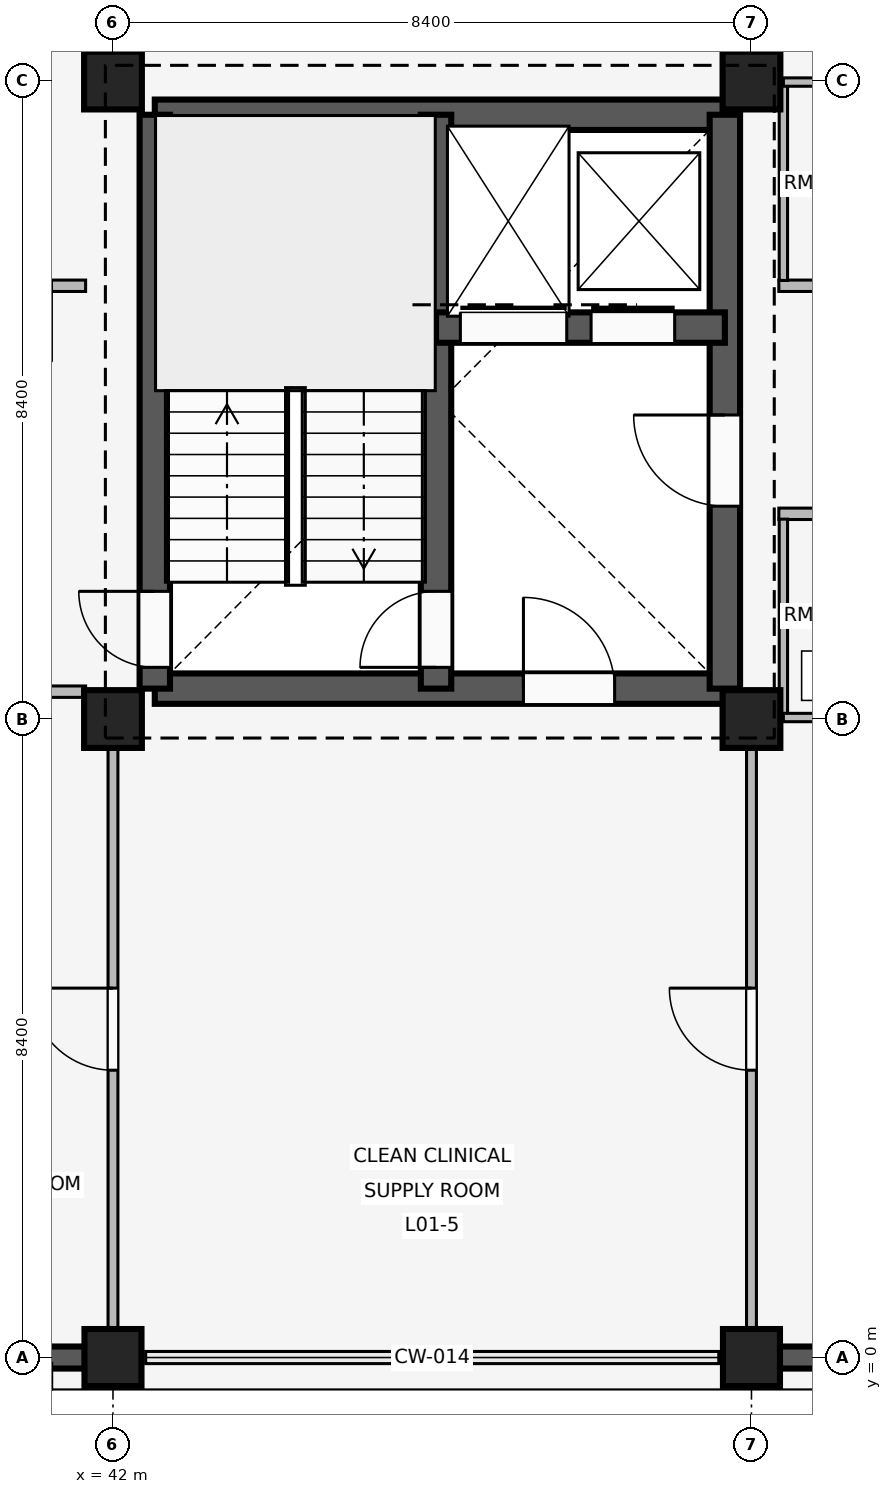
"""IFC4 building model, lengths in metres.
Left out: names, types, materials, properties, quantities, classifications, styles, units other than length and angle.
Written with IfcOpenShell. Run it as: python <this file> out.ifc"""

import sys

from ifc_helpers import new_model, si_unit, direction, frame, frame_2d, origin, origin_2d, place, context, subcontext, project, spatial, rectangle, extrude, element, fill, save


model = new_model("IFC4")
c1 = context("Model", 3, precision=1e-05, world=origin(), true_north=direction((0.0, 1.0)))
c2 = subcontext(c1, "Body", "Model", "MODEL_VIEW")
j1 = project(units=[si_unit("LENGTHUNIT", "METRE"), si_unit("PLANEANGLEUNIT", "RADIAN")], contexts=[c1])
p1 = place(None, origin())
s1 = spatial("IfcSite", under=j1, at=p1, CompositionType="ELEMENT")
p2 = place(p1, origin())
s2 = spatial("IfcBuilding", under=s1, at=p2, CompositionType="ELEMENT")
p3 = place(p2, frame((0.0, 0.0, 4.8)))
s3 = spatial("IfcBuildingStorey", under=s2, at=p3, CompositionType="ELEMENT", Elevation=4.8)
p4 = place(p3, frame((42.0, 0.0, 0.0), z_axis=(0.0, 0.0, 1.0), x_axis=(1.0, 0.0, 0.0)))
e1 = element("IfcColumn", 1, at=p4, inside=s3, PredefinedType="COLUMN", context=c2, shape_type="SweptSolid", body=[
    extrude(rectangle(XDim=0.75, YDim=0.75, at=origin_2d()), origin(), (0.0, 0.0, 1.0), 3.3),
])
for number, where, z_axis, x_axis in (
    (2, (42.0, 8.4, 0.0), (0.0, 0.0, 1.0), (1.0, 0.0, 0.0)),
    (3, (42.0, 16.8, 0.0), (0.0, 0.0, 1.0), (1.0, 0.0, 0.0)),
):
    element("IfcColumn", number, at=place(p3, frame(where, z_axis=z_axis, x_axis=x_axis)), inside=s3, PredefinedType="COLUMN", context=c2, shape_type="SweptSolid", body=[
        extrude(rectangle(XDim=0.76, YDim=0.76, at=origin_2d()), origin(), (0.0, 0.0, 1.0), 3.3),
    ])
p5 = place(p3, frame((50.4, 0.0, 0.0), z_axis=(0.0, 0.0, 1.0), x_axis=(1.0, 0.0, 0.0)))
e4 = element("IfcColumn", 4, at=p5, inside=s3, PredefinedType="COLUMN", context=c2, shape_type="SweptSolid", body=[
    extrude(rectangle(XDim=0.75, YDim=0.75, at=origin_2d()), origin(), (0.0, 0.0, 1.0), 3.3),
])
for number, where, z_axis, x_axis in (
    (5, (50.4, 8.4, 0.0), (0.0, 0.0, 1.0), (1.0, 0.0, 0.0)),
    (6, (50.4, 16.8, 0.0), (0.0, 0.0, 1.0), (1.0, 0.0, 0.0)),
):
    element("IfcColumn", number, at=place(p3, frame(where, z_axis=z_axis, x_axis=x_axis)), inside=s3, PredefinedType="COLUMN", context=c2, shape_type="SweptSolid", body=[
        extrude(rectangle(XDim=0.76, YDim=0.76, at=origin_2d()), origin(), (0.0, 0.0, 1.0), 3.3),
    ])
p6 = place(p3, frame((41.63, 0.0, 0.0), z_axis=(0.0, 0.0, 1.0), x_axis=(-1.0, 0.0, 0.0)))
e7 = element("IfcWall", 7, at=p6, inside=s3, PredefinedType="SOLIDWALL", context=c2, shape_type="SweptSolid", body=[
    extrude(rectangle(XDim=7.66, YDim=0.29, at=frame_2d((3.83, 0.0))), origin(), (0.0, 0.0, 1.0), 2.42),
])
p7 = place(p6, frame((5.088, 0.0, 0.85)))
e8 = element("IfcOpeningElement", 8, at=p7, cuts=e7, PredefinedType="OPENING", context=c2, shape_type="SweptSolid", body=[
    extrude(rectangle(XDim=1.62, YDim=0.95, at=frame_2d((0.81, 0.475))), frame((0.0, 0.155, 0.0), z_axis=(0.0, -1.0, 0.0), x_axis=(1.0, 0.0, 0.0)), (0.0, 0.0, 1.0), 0.31),
])
p8 = place(p3, frame((58.43, 0.0, 0.0), z_axis=(0.0, 0.0, 1.0), x_axis=(-1.0, 0.0, 0.0)))
e9 = element("IfcWall", 9, at=p8, inside=s3, PredefinedType="SOLIDWALL", context=c2, shape_type="SweptSolid", body=[
    extrude(rectangle(XDim=7.66, YDim=0.29, at=frame_2d((3.83, 0.0))), origin(), (0.0, 0.0, 1.0), 2.42),
])
p9 = place(p8, frame((0.952, 0.0, 0.85)))
e10 = element("IfcOpeningElement", 10, at=p9, cuts=e9, PredefinedType="OPENING", context=c2, shape_type="SweptSolid", body=[
    extrude(rectangle(XDim=1.62, YDim=0.95, at=frame_2d((0.81, 0.475))), frame((0.0, 0.155, 0.0), z_axis=(0.0, -1.0, 0.0), x_axis=(1.0, 0.0, 0.0)), (0.0, 0.0, 1.0), 0.31),
])
p10 = place(p8, frame((5.088, 0.0, 0.85)))
e11 = element("IfcOpeningElement", 11, at=p10, cuts=e9, PredefinedType="OPENING", context=c2, shape_type="SweptSolid", body=[
    extrude(rectangle(XDim=1.62, YDim=0.95, at=frame_2d((0.81, 0.475))), frame((0.0, 0.155, 0.0), z_axis=(0.0, -1.0, 0.0), x_axis=(1.0, 0.0, 0.0)), (0.0, 0.0, 1.0), 0.31),
])
p11 = place(p3, frame((42.55, 8.8, 0.0), z_axis=(0.0, 0.0, 1.0), x_axis=(1.0, 0.0, 0.0)))
e12 = element("IfcWall", 12, at=p11, inside=s3, PredefinedType="SHEAR", context=c2, shape_type="SweptSolid", body=[
    extrude(rectangle(XDim=7.5, YDim=0.4, at=frame_2d((3.75, 0.0))), origin(), (0.0, 0.0, 1.0), 3.02),
])
p12 = place(p11, frame((4.85, 0.0, 0.0)))
e13 = element("IfcOpeningElement", 13, at=p12, cuts=e12, PredefinedType="OPENING", context=c2, shape_type="SweptSolid", body=[
    extrude(rectangle(XDim=1.2, YDim=2.1, at=frame_2d((0.6, 1.05))), frame((0.0, 0.21, 0.0), z_axis=(0.0, -1.0, 0.0), x_axis=(1.0, 0.0, 0.0)), (0.0, 0.0, 1.0), 0.42),
])
p13 = place(p3, frame((42.55, 16.35, 0.0), z_axis=(0.0, 0.0, 1.0), x_axis=(1.0, 0.0, 0.0)))
e14 = element("IfcWall", 14, at=p13, inside=s3, PredefinedType="SHEAR", context=c2, shape_type="SweptSolid", body=[
    extrude(rectangle(XDim=7.5, YDim=0.4, at=frame_2d((3.75, 0.0))), origin(), (0.0, 0.0, 1.0), 3.02),
])
p14 = place(p3, frame((42.55, 8.8, 0.0), z_axis=(0.0, 0.0, 1.0), x_axis=(0.0, 1.0, 0.0)))
e15 = element("IfcWall", 15, at=p14, inside=s3, PredefinedType="SHEAR", context=c2, shape_type="SweptSolid", body=[
    extrude(rectangle(XDim=7.55, YDim=0.4, at=frame_2d((3.775, 0.0))), origin(), (0.0, 0.0, 1.0), 3.02),
])
p15 = place(p14, frame((0.28, 0.0, 0.0)))
e16 = element("IfcOpeningElement", 16, at=p15, cuts=e15, PredefinedType="OPENING", context=c2, shape_type="SweptSolid", body=[
    extrude(rectangle(XDim=1.0, YDim=2.15, at=frame_2d((0.5, 1.075))), frame((0.0, 0.21, 0.0), z_axis=(0.0, -1.0, 0.0), x_axis=(1.0, 0.0, 0.0)), (0.0, 0.0, 1.0), 0.42),
])
p16 = place(p3, frame((50.05, 8.8, 0.0), z_axis=(0.0, 0.0, 1.0), x_axis=(0.0, 1.0, 0.0)))
e17 = element("IfcWall", 17, at=p16, inside=s3, PredefinedType="SHEAR", context=c2, shape_type="SweptSolid", body=[
    extrude(rectangle(XDim=7.55, YDim=0.4, at=frame_2d((3.775, 0.0))), origin(), (0.0, 0.0, 1.0), 3.02),
])
p17 = place(p16, frame((2.4, 0.0, 0.0)))
e18 = element("IfcOpeningElement", 18, at=p17, cuts=e17, PredefinedType="OPENING", context=c2, shape_type="SweptSolid", body=[
    extrude(rectangle(XDim=1.2, YDim=2.2, at=frame_2d((0.6, 1.1))), frame((0.0, 0.21, 0.0), z_axis=(0.0, -1.0, 0.0), x_axis=(1.0, 0.0, 0.0)), (0.0, 0.0, 1.0), 0.42),
])
p18 = place(p3, frame((46.25, 8.8, 0.0), z_axis=(0.0, 0.0, 1.0), x_axis=(0.0, 1.0, 0.0)))
e19 = element("IfcWall", 19, at=p18, inside=s3, PredefinedType="SHEAR", context=c2, shape_type="SweptSolid", body=[
    extrude(rectangle(XDim=7.55, YDim=0.4, at=frame_2d((3.775, 0.0))), origin(), (0.0, 0.0, 1.0), 3.02),
])
p19 = place(p18, frame((0.28, 0.0, 0.0)))
e20 = element("IfcOpeningElement", 20, at=p19, cuts=e19, PredefinedType="OPENING", context=c2, shape_type="SweptSolid", body=[
    extrude(rectangle(XDim=1.0, YDim=2.15, at=frame_2d((0.5, 1.075))), frame((0.0, 0.21, 0.0), z_axis=(0.0, -1.0, 0.0), x_axis=(1.0, 0.0, 0.0)), (0.0, 0.0, 1.0), 0.42),
])
p20 = place(p3, frame((46.25, 13.55, 0.0), z_axis=(0.0, 0.0, 1.0), x_axis=(1.0, 0.0, 0.0)))
e21 = element("IfcWall", 21, at=p20, inside=s3, PredefinedType="SHEAR", context=c2, shape_type="SweptSolid", body=[
    extrude(rectangle(XDim=3.8, YDim=0.4, at=frame_2d((1.9, 0.0))), origin(), (0.0, 0.0, 1.0), 3.02),
])
p21 = place(p20, frame((0.32, 0.0, 0.0)))
e22 = element("IfcOpeningElement", 22, at=p21, cuts=e21, PredefinedType="OPENING", context=c2, shape_type="SweptSolid", body=[
    extrude(rectangle(XDim=1.4, YDim=2.25, at=frame_2d((0.7, 1.125))), frame((0.0, 0.21, 0.0), z_axis=(0.0, -1.0, 0.0), x_axis=(1.0, 0.0, 0.0)), (0.0, 0.0, 1.0), 0.42),
])
p22 = place(p20, frame((2.04, 0.0, 0.0)))
e23 = element("IfcOpeningElement", 23, at=p22, cuts=e21, PredefinedType="OPENING", context=c2, shape_type="SweptSolid", body=[
    extrude(rectangle(XDim=1.1, YDim=2.15, at=frame_2d((0.55, 1.075))), frame((0.0, 0.21, 0.0), z_axis=(0.0, -1.0, 0.0), x_axis=(1.0, 0.0, 0.0)), (0.0, 0.0, 1.0), 0.42),
])
p23 = place(p3, frame((39.46, 8.76, 0.0), z_axis=(0.0, 0.0, 1.0), x_axis=(1.0, 0.0, 0.0)))
e24 = element("IfcWall", 24, at=p23, inside=s3, PredefinedType="PARTITIONING", context=c2, shape_type="SweptSolid", body=[
    extrude(rectangle(XDim=2.18, YDim=0.15, at=frame_2d((1.09, 0.0))), origin(), (0.0, 0.0, 1.0), 2.4),
])
p24 = place(p23, frame((0.5, 0.0, 0.0)))
e25 = element("IfcOpeningElement", 25, at=p24, cuts=e24, PredefinedType="OPENING", context=c2, shape_type="SweptSolid", body=[
    extrude(rectangle(XDim=1.08, YDim=2.15, at=frame_2d((0.54, 1.075))), frame((0.0, 0.085, 0.0), z_axis=(0.0, -1.0, 0.0), x_axis=(1.0, 0.0, 0.0)), (0.0, 0.0, 1.0), 0.17),
])
p25 = place(p3, frame((41.64, 14.1, 0.0), z_axis=(0.0, 0.0, 1.0), x_axis=(-1.0, 0.0, 0.0)))
e26 = element("IfcWall", 26, at=p25, inside=s3, PredefinedType="PARTITIONING", context=c2, shape_type="SweptSolid", body=[
    extrude(rectangle(XDim=7.96, YDim=0.15, at=frame_2d((3.98, 0.0))), origin(), (0.0, 0.0, 1.0), 2.4),
])
p26 = place(p25, frame((0.45, 0.0, 0.0)))
e27 = element("IfcOpeningElement", 27, at=p26, cuts=e26, PredefinedType="OPENING", context=c2, shape_type="SweptSolid", body=[
    extrude(rectangle(XDim=1.0, YDim=2.15, at=frame_2d((0.5, 1.075))), frame((0.0, 0.085, 0.0), z_axis=(0.0, -1.0, 0.0), x_axis=(1.0, 0.0, 0.0)), (0.0, 0.0, 1.0), 0.17),
])
p27 = place(p25, frame((4.15, 0.0, 0.0)))
e28 = element("IfcOpeningElement", 28, at=p27, cuts=e26, PredefinedType="OPENING", context=c2, shape_type="SweptSolid", body=[
    extrude(rectangle(XDim=1.0, YDim=2.15, at=frame_2d((0.5, 1.075))), frame((0.0, 0.085, 0.0), z_axis=(0.0, -1.0, 0.0), x_axis=(1.0, 0.0, 0.0)), (0.0, 0.0, 1.0), 0.17),
])
p28 = place(p3, frame((42.0, 0.14, 0.0), z_axis=(0.0, 0.0, 1.0), x_axis=(0.0, 1.0, 0.0)))
e29 = element("IfcWall", 29, at=p28, inside=s3, PredefinedType="PARTITIONING", context=c2, shape_type="SweptSolid", body=[
    extrude(rectangle(XDim=8.21, YDim=0.13, at=frame_2d((4.105, 0.0))), origin(), (0.0, 0.0, 1.0), 2.4),
])
p29 = place(p28, frame((3.64, 0.0, 0.0)))
e30 = element("IfcOpeningElement", 30, at=p29, cuts=e29, PredefinedType="OPENING", context=c2, shape_type="SweptSolid", body=[
    extrude(rectangle(XDim=1.08, YDim=2.15, at=frame_2d((0.54, 1.075))), frame((0.0, 0.075, 0.0), z_axis=(0.0, -1.0, 0.0), x_axis=(1.0, 0.0, 0.0)), (0.0, 0.0, 1.0), 0.15),
])
p30 = place(p3, frame((42.0, 17.15, 0.0), z_axis=(0.0, 0.0, 1.0), x_axis=(0.0, 1.0, 0.0)))
e31 = element("IfcWall", 31, at=p30, inside=s3, PredefinedType="PARTITIONING", context=c2, shape_type="SweptSolid", body=[
    extrude(rectangle(XDim=7.91, YDim=0.13, at=frame_2d((3.955, 0.0))), origin(), (0.0, 0.0, 1.0), 2.4),
])
p31 = place(p30, frame((3.4, 0.0, 0.0)))
e32 = element("IfcOpeningElement", 32, at=p31, cuts=e31, PredefinedType="OPENING", context=c2, shape_type="SweptSolid", body=[
    extrude(rectangle(XDim=1.05, YDim=2.2, at=frame_2d((0.525, 1.1))), frame((0.0, 0.075, 0.0), z_axis=(0.0, -1.0, 0.0), x_axis=(1.0, 0.0, 0.0)), (0.0, 0.0, 1.0), 0.15),
])
p32 = place(p3, frame((50.4, 0.14, 0.0), z_axis=(0.0, 0.0, 1.0), x_axis=(0.0, 1.0, 0.0)))
e33 = element("IfcWall", 33, at=p32, inside=s3, PredefinedType="PARTITIONING", context=c2, shape_type="SweptSolid", body=[
    extrude(rectangle(XDim=8.21, YDim=0.13, at=frame_2d((4.105, 0.0))), origin(), (0.0, 0.0, 1.0), 2.4),
])
p33 = place(p32, frame((3.64, 0.0, 0.0)))
e34 = element("IfcOpeningElement", 34, at=p33, cuts=e33, PredefinedType="OPENING", context=c2, shape_type="SweptSolid", body=[
    extrude(rectangle(XDim=1.08, YDim=2.15, at=frame_2d((0.54, 1.075))), frame((0.0, 0.075, 0.0), z_axis=(0.0, -1.0, 0.0), x_axis=(1.0, 0.0, 0.0)), (0.0, 0.0, 1.0), 0.15),
])
p34 = place(p3, frame((50.4, 17.15, 0.0), z_axis=(0.0, 0.0, 1.0), x_axis=(0.0, 1.0, 0.0)))
e35 = element("IfcWall", 35, at=p34, inside=s3, PredefinedType="PARTITIONING", context=c2, shape_type="SweptSolid", body=[
    extrude(rectangle(XDim=7.91, YDim=0.13, at=frame_2d((3.955, 0.0))), origin(), (0.0, 0.0, 1.0), 2.4),
])
p35 = place(p34, frame((3.4, 0.0, 0.0)))
e36 = element("IfcOpeningElement", 36, at=p35, cuts=e35, PredefinedType="OPENING", context=c2, shape_type="SweptSolid", body=[
    extrude(rectangle(XDim=1.05, YDim=2.2, at=frame_2d((0.525, 1.1))), frame((0.0, 0.075, 0.0), z_axis=(0.0, -1.0, 0.0), x_axis=(1.0, 0.0, 0.0)), (0.0, 0.0, 1.0), 0.15),
])
p36 = place(p3, frame((50.76, 11.1, 0.0), z_axis=(0.0, 0.0, 1.0), x_axis=(1.0, 0.0, 0.0)))
e37 = element("IfcWall", 37, at=p36, inside=s3, PredefinedType="PARTITIONING", context=c2, shape_type="SweptSolid", body=[
    extrude(rectangle(XDim=7.96, YDim=0.15, at=frame_2d((3.98, 0.0))), origin(), (0.0, 0.0, 1.0), 2.4),
])
p37 = place(p36, frame((2.25, 0.0, 0.0)))
e38 = element("IfcOpeningElement", 38, at=p37, cuts=e37, PredefinedType="OPENING", context=c2, shape_type="SweptSolid", body=[
    extrude(rectangle(XDim=1.0, YDim=2.15, at=frame_2d((0.5, 1.075))), frame((0.0, 0.085, 0.0), z_axis=(0.0, -1.0, 0.0), x_axis=(1.0, 0.0, 0.0)), (0.0, 0.0, 1.0), 0.17),
])
p38 = place(p36, frame((5.95, 0.0, 0.0)))
e39 = element("IfcOpeningElement", 39, at=p38, cuts=e37, PredefinedType="OPENING", context=c2, shape_type="SweptSolid", body=[
    extrude(rectangle(XDim=1.0, YDim=2.15, at=frame_2d((0.5, 1.075))), frame((0.0, 0.085, 0.0), z_axis=(0.0, -1.0, 0.0), x_axis=(1.0, 0.0, 0.0)), (0.0, 0.0, 1.0), 0.17),
])
p39 = place(p3, frame((50.82, 8.42, 0.0), z_axis=(0.0, 0.0, 1.0), x_axis=(0.0, 1.0, 0.0)))
e40 = element("IfcWall", 40, at=p39, inside=s3, PredefinedType="PARTITIONING", context=c2, shape_type="SweptSolid", body=[
    extrude(rectangle(XDim=2.61, YDim=0.11, at=frame_2d((1.305, 0.0))), origin(), (0.0, 0.0, 1.0), 2.4),
])
p40 = place(p3, frame((50.82, 8.42, 0.0), z_axis=(0.0, 0.0, 1.0), x_axis=(1.0, 0.0, 0.0)))
e41 = element("IfcWall", 41, at=p40, inside=s3, PredefinedType="PARTITIONING", context=c2, shape_type="SweptSolid", body=[
    extrude(rectangle(XDim=1.98, YDim=0.11, at=frame_2d((0.99, 0.0))), origin(), (0.0, 0.0, 1.0), 2.4),
])
p41 = place(p40, frame((0.54, 0.0, 0.0)))
e42 = element("IfcOpeningElement", 42, at=p41, cuts=e41, PredefinedType="OPENING", context=c2, shape_type="SweptSolid", body=[
    extrude(rectangle(XDim=0.9, YDim=2.1, at=frame_2d((0.45, 1.05))), frame((0.0, 0.065, 0.0), z_axis=(0.0, -1.0, 0.0), x_axis=(1.0, 0.0, 0.0)), (0.0, 0.0, 1.0), 0.13),
])
p42 = place(p3, frame((58.72, 14.1, 0.0), z_axis=(0.0, 0.0, 1.0), x_axis=(-1.0, 0.0, 0.0)))
e43 = element("IfcWall", 43, at=p42, inside=s3, PredefinedType="PARTITIONING", context=c2, shape_type="SweptSolid", body=[
    extrude(rectangle(XDim=7.96, YDim=0.15, at=frame_2d((3.98, 0.0))), origin(), (0.0, 0.0, 1.0), 2.4),
])
p43 = place(p42, frame((0.73, 0.0, 0.0)))
e44 = element("IfcOpeningElement", 44, at=p43, cuts=e43, PredefinedType="OPENING", context=c2, shape_type="SweptSolid", body=[
    extrude(rectangle(XDim=1.0, YDim=2.15, at=frame_2d((0.5, 1.075))), frame((0.0, 0.085, 0.0), z_axis=(0.0, -1.0, 0.0), x_axis=(1.0, 0.0, 0.0)), (0.0, 0.0, 1.0), 0.17),
])
p44 = place(p42, frame((4.43, 0.0, 0.0)))
e45 = element("IfcOpeningElement", 45, at=p44, cuts=e43, PredefinedType="OPENING", context=c2, shape_type="SweptSolid", body=[
    extrude(rectangle(XDim=1.0, YDim=2.15, at=frame_2d((0.5, 1.075))), frame((0.0, 0.085, 0.0), z_axis=(0.0, -1.0, 0.0), x_axis=(1.0, 0.0, 0.0)), (0.0, 0.0, 1.0), 0.17),
])
p45 = place(p3, frame((50.82, 14.17, 0.0), z_axis=(0.0, 0.0, 1.0), x_axis=(0.0, 1.0, 0.0)))
e46 = element("IfcWall", 46, at=p45, inside=s3, PredefinedType="PARTITIONING", context=c2, shape_type="SweptSolid", body=[
    extrude(rectangle(XDim=2.61, YDim=0.11, at=frame_2d((1.305, 0.0))), origin(), (0.0, 0.0, 1.0), 2.4),
])
p46 = place(p3, frame((50.82, 16.78, 0.0), z_axis=(0.0, 0.0, 1.0), x_axis=(1.0, 0.0, 0.0)))
e47 = element("IfcWall", 47, at=p46, inside=s3, PredefinedType="PARTITIONING", context=c2, shape_type="SweptSolid", body=[
    extrude(rectangle(XDim=1.98, YDim=0.11, at=frame_2d((0.99, 0.0))), origin(), (0.0, 0.0, 1.0), 2.4),
])
p47 = place(p46, frame((0.54, 0.0, 0.0)))
e48 = element("IfcOpeningElement", 48, at=p47, cuts=e47, PredefinedType="OPENING", context=c2, shape_type="SweptSolid", body=[
    extrude(rectangle(XDim=0.9, YDim=2.1, at=frame_2d((0.45, 1.05))), frame((0.0, 0.065, 0.0), z_axis=(0.0, -1.0, 0.0), x_axis=(1.0, 0.0, 0.0)), (0.0, 0.0, 1.0), 0.13),
])
p48 = place(p17, origin())
e49 = element("IfcDoor", 49, at=p48, inside=s3, OperationType="SINGLE_SWING_RIGHT", PredefinedType="DOOR", context=c2, shape_type="SweptSolid", body=[
    extrude(rectangle(XDim=1.2, YDim=2.2, at=frame_2d((0.6, 1.1))), frame((0.0, 0.025, 0.0), z_axis=(0.0, -1.0, 0.0), x_axis=(1.0, 0.0, 0.0)), (0.0, 0.0, 1.0), 0.05),
])
fill(e18, e49)
p49 = place(p12, origin())
e50 = element("IfcDoor", 50, at=p49, inside=s3, OperationType="SINGLE_SWING_LEFT", PredefinedType="DOOR", context=c2, shape_type="SweptSolid", body=[
    extrude(rectangle(XDim=1.2, YDim=2.1, at=frame_2d((0.6, 1.05))), frame((0.0, 0.025, 0.0), z_axis=(0.0, -1.0, 0.0), x_axis=(1.0, 0.0, 0.0)), (0.0, 0.0, 1.0), 0.05),
])
fill(e13, e50)
p50 = place(p15, origin())
e51 = element("IfcDoor", 51, at=p50, inside=s3, OperationType="SINGLE_SWING_RIGHT", PredefinedType="DOOR", context=c2, shape_type="SweptSolid", body=[
    extrude(rectangle(XDim=1.0, YDim=2.15, at=frame_2d((0.5, 1.075))), frame((0.0, 0.025, 0.0), z_axis=(0.0, -1.0, 0.0), x_axis=(1.0, 0.0, 0.0)), (0.0, 0.0, 1.0), 0.05),
])
fill(e16, e51)
p51 = place(p19, origin())
e52 = element("IfcDoor", 52, at=p51, inside=s3, OperationType="SINGLE_SWING_LEFT", PredefinedType="DOOR", context=c2, shape_type="SweptSolid", body=[
    extrude(rectangle(XDim=1.0, YDim=2.15, at=frame_2d((0.5, 1.075))), frame((0.0, 0.025, 0.0), z_axis=(0.0, -1.0, 0.0), x_axis=(1.0, 0.0, 0.0)), (0.0, 0.0, 1.0), 0.05),
])
fill(e20, e52)
p52 = place(p21, origin())
e53 = element("IfcDoor", 53, at=p52, inside=s3, OperationType="SLIDING_TO_LEFT", PredefinedType="DOOR", context=c2, shape_type="SweptSolid", body=[
    extrude(rectangle(XDim=1.4, YDim=2.25, at=frame_2d((0.7, 1.125))), frame((0.0, 0.025, 0.0), z_axis=(0.0, -1.0, 0.0), x_axis=(1.0, 0.0, 0.0)), (0.0, 0.0, 1.0), 0.05),
])
fill(e22, e53)
p53 = place(p22, origin())
e54 = element("IfcDoor", 54, at=p53, inside=s3, OperationType="SLIDING_TO_LEFT", PredefinedType="DOOR", context=c2, shape_type="SweptSolid", body=[
    extrude(rectangle(XDim=1.1, YDim=2.15, at=frame_2d((0.55, 1.075))), frame((0.0, 0.025, 0.0), z_axis=(0.0, -1.0, 0.0), x_axis=(1.0, 0.0, 0.0)), (0.0, 0.0, 1.0), 0.05),
])
fill(e23, e54)
p54 = place(p29, origin())
e55 = element("IfcDoor", 55, at=p54, inside=s3, OperationType="SINGLE_SWING_RIGHT", PredefinedType="DOOR", context=c2, shape_type="SweptSolid", body=[
    extrude(rectangle(XDim=1.08, YDim=2.15, at=frame_2d((0.54, 1.075))), frame((0.0, 0.025, 0.0), z_axis=(0.0, -1.0, 0.0), x_axis=(1.0, 0.0, 0.0)), (0.0, 0.0, 1.0), 0.05),
])
fill(e30, e55)
p55 = place(p33, origin())
e56 = element("IfcDoor", 56, at=p55, inside=s3, OperationType="SINGLE_SWING_RIGHT", PredefinedType="DOOR", context=c2, shape_type="SweptSolid", body=[
    extrude(rectangle(XDim=1.08, YDim=2.15, at=frame_2d((0.54, 1.075))), frame((0.0, 0.025, 0.0), z_axis=(0.0, -1.0, 0.0), x_axis=(1.0, 0.0, 0.0)), (0.0, 0.0, 1.0), 0.05),
])
fill(e34, e56)
save(model, sys.argv[1])
